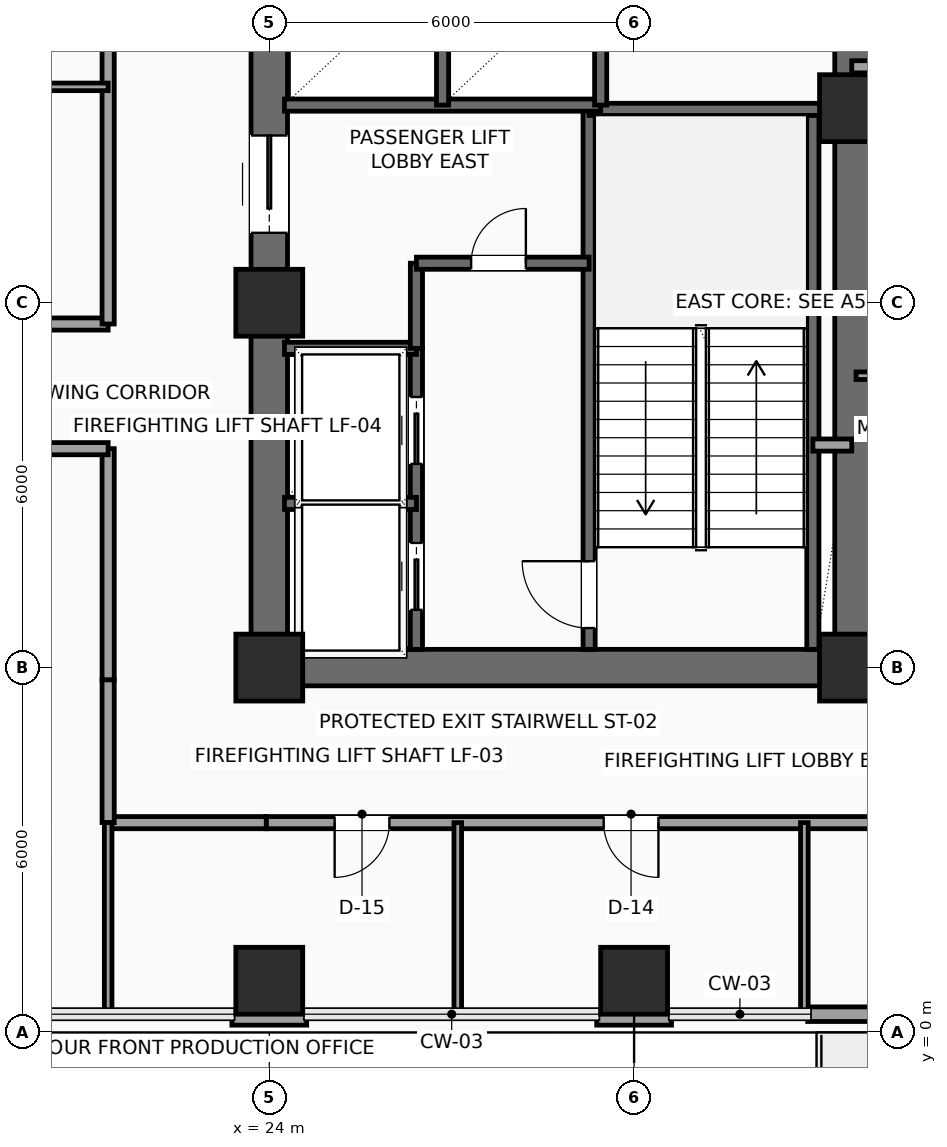
"""IFC4 building model, lengths in metres.
Left out: names, types, materials, properties, quantities, classifications, styles, units other than length and angle.
Written with IfcOpenShell. Run it as: python <this file> out.ifc"""

import sys

from ifc_helpers import new_model, si_unit, direction, frame, frame_2d, origin, origin_2d, place, context, subcontext, project, spatial, rectangle, extrude, element, fill, save


model = new_model("IFC4")
c1 = context("Model", 3, precision=1e-05, world=origin(), true_north=direction((0.0, 1.0)))
c2 = subcontext(c1, "Body", "Model", "MODEL_VIEW")
j1 = project(units=[si_unit("LENGTHUNIT", "METRE"), si_unit("PLANEANGLEUNIT", "RADIAN")], contexts=[c1])
p1 = place(None, origin())
s1 = spatial("IfcSite", under=j1, at=p1, CompositionType="ELEMENT")
p2 = place(p1, origin())
s2 = spatial("IfcBuilding", under=s1, at=p2, CompositionType="ELEMENT")
p3 = place(p2, frame((0.0, 0.0, 149.4)))
s3 = spatial("IfcBuildingStorey", under=s2, at=p3, CompositionType="ELEMENT", Elevation=149.4)
for number, where, z_axis, x_axis in (
    (1, (24.0, 6.0, 0.0), (0.0, 0.0, 1.0), (1.0, 0.0, 0.0)),
    (2, (24.0, 12.0, 0.0), (0.0, 0.0, 1.0), (1.0, 0.0, 0.0)),
    (3, (33.6, 6.0, 0.0), (0.0, 0.0, 1.0), (1.0, 0.0, 0.0)),
    (4, (33.6, 15.2, 0.0), (0.0, 0.0, 1.0), (1.0, 0.0, 0.0)),
    (5, (24.0, 0.85, 0.0), (0.0, 0.0, 1.0), (1.0, 0.0, 0.0)),
    (6, (30.0, 0.85, 0.0), (0.0, 0.0, 1.0), (1.0, 0.0, 0.0)),
):
    element("IfcColumn", number, at=place(p3, frame(where, z_axis=z_axis, x_axis=x_axis)), inside=s3, PredefinedType="COLUMN", context=c2, shape_type="SweptSolid", body=[
        extrude(rectangle(XDim=1.1, YDim=1.1, at=origin_2d()), origin(), (0.0, 0.0, 1.0), 3.75),
    ])
p4 = place(p3, frame((42.145, 0.3, 0.0), z_axis=(0.0, 0.0, 1.0), x_axis=(-1.0, 0.0, 0.0)))
e7 = element("IfcWall", 7, at=p4, inside=s3, PredefinedType="SOLIDWALL", context=c2, shape_type="SweptSolid", body=[
    extrude(rectangle(XDim=9.29, YDim=0.24, at=frame_2d((4.645, 0.0))), origin(), (0.0, 0.0, 1.0), 3.525),
])
p5 = place(p4, frame((4.2, 0.0, 0.0)))
e8 = element("IfcOpeningElement", 8, at=p5, cuts=e7, PredefinedType="OPENING", context=c2, shape_type="SweptSolid", body=[
    extrude(rectangle(XDim=1.05, YDim=2.2, at=frame_2d((0.525, 1.1))), frame((0.0, 0.13, 0.0), z_axis=(0.0, -1.0, 0.0), x_axis=(1.0, 0.0, 0.0)), (0.0, 0.0, 1.0), 0.26),
])
for number, where, z_axis, x_axis in (
    (9, (30.615, 0.24, 0.0), (0.0, 0.0, 1.0), (-1.0, 0.0, 0.0)),
    (10, (24.615, 0.24, 0.0), (0.0, 0.0, 1.0), (-1.0, 0.0, 0.0)),
):
    element("IfcWall", number, at=place(p3, frame(where, z_axis=z_axis, x_axis=x_axis)), inside=s3, PredefinedType="SOLIDWALL", context=c2, shape_type="SweptSolid", body=[
        extrude(rectangle(XDim=1.23, YDim=0.24, at=frame_2d((0.615, 0.0))), origin(), (0.0, 0.0, 1.0), 3.525),
    ])
p6 = place(p3, frame((24.0, 6.0, 0.0), z_axis=(0.0, 0.0, 1.0), x_axis=(1.0, 0.0, 0.0)))
e11 = element("IfcWall", 11, at=p6, inside=s3, PredefinedType="SHEAR", context=c2, shape_type="SweptSolid", body=[
    extrude(rectangle(XDim=9.6, YDim=0.6, at=frame_2d((4.8, 0.0))), origin(), (0.0, 0.0, 1.0), 3.525),
])
p7 = place(p3, frame((24.0, 6.0, 0.0), z_axis=(0.0, 0.0, 1.0), x_axis=(0.0, 1.0, 0.0)))
e12 = element("IfcWall", 12, at=p7, inside=s3, PredefinedType="SHEAR", context=c2, shape_type="SweptSolid", body=[
    extrude(rectangle(XDim=12.0, YDim=0.6, at=frame_2d((6.0, 0.0))), origin(), (0.0, 0.0, 1.0), 3.525),
])
p8 = place(p7, frame((7.15, 0.0, 0.0)))
e13 = element("IfcOpeningElement", 13, at=p8, cuts=e12, PredefinedType="OPENING", context=c2, shape_type="SweptSolid", body=[
    extrude(rectangle(XDim=1.6, YDim=2.3, at=frame_2d((0.8, 1.15))), frame((0.0, 0.31, 0.0), z_axis=(0.0, -1.0, 0.0), x_axis=(1.0, 0.0, 0.0)), (0.0, 0.0, 1.0), 0.62),
])
p9 = place(p3, frame((33.6, 6.0, 0.0), z_axis=(0.0, 0.0, 1.0), x_axis=(0.0, 1.0, 0.0)))
e14 = element("IfcWall", 14, at=p9, inside=s3, PredefinedType="SHEAR", context=c2, shape_type="SweptSolid", body=[
    extrude(rectangle(XDim=12.0, YDim=0.6, at=frame_2d((6.0, 0.0))), origin(), (0.0, 0.0, 1.0), 3.525),
])
p10 = place(p9, frame((10.15, 0.0, 0.0)))
e15 = element("IfcOpeningElement", 15, at=p10, cuts=e14, PredefinedType="OPENING", context=c2, shape_type="SweptSolid", body=[
    extrude(rectangle(XDim=0.9, YDim=2.15, at=frame_2d((0.45, 1.075))), frame((0.0, 0.31, 0.0), z_axis=(0.0, -1.0, 0.0), x_axis=(1.0, 0.0, 0.0)), (0.0, 0.0, 1.0), 0.62),
])
p11 = place(p3, frame((29.26, 6.3, 0.0), z_axis=(0.0, 0.0, 1.0), x_axis=(0.0, 1.0, 0.0)))
e16 = element("IfcWall", 16, at=p11, inside=s3, PredefinedType="SHEAR", context=c2, shape_type="SweptSolid", body=[
    extrude(rectangle(XDim=8.88, YDim=0.2, at=frame_2d((4.44, 0.0))), origin(), (0.0, 0.0, 1.0), 3.525),
])
p12 = place(p11, frame((0.35, 0.0, 0.0)))
e17 = element("IfcOpeningElement", 17, at=p12, cuts=e16, PredefinedType="OPENING", context=c2, shape_type="SweptSolid", body=[
    extrude(rectangle(XDim=1.1, YDim=2.2, at=frame_2d((0.55, 1.1))), frame((0.0, 0.11, 0.0), z_axis=(0.0, -1.0, 0.0), x_axis=(1.0, 0.0, 0.0)), (0.0, 0.0, 1.0), 0.22),
])
p13 = place(p3, frame((32.94, 6.3, 0.0), z_axis=(0.0, 0.0, 1.0), x_axis=(0.0, 1.0, 0.0)))
e18 = element("IfcWall", 18, at=p13, inside=s3, PredefinedType="SHEAR", context=c2, shape_type="SweptSolid", body=[
    extrude(rectangle(XDim=8.88, YDim=0.2, at=frame_2d((4.44, 0.0))), origin(), (0.0, 0.0, 1.0), 3.525),
])
p14 = place(p3, frame((29.26, 15.18, 0.0), z_axis=(0.0, 0.0, 1.0), x_axis=(1.0, 0.0, 0.0)))
e19 = element("IfcWall", 19, at=p14, inside=s3, PredefinedType="SHEAR", context=c2, shape_type="SweptSolid", body=[
    extrude(rectangle(XDim=4.04, YDim=0.2, at=frame_2d((2.02, 0.0))), origin(), (0.0, 0.0, 1.0), 3.525),
])
p15 = place(p3, frame((26.42, 6.3, 0.0), z_axis=(0.0, 0.0, 1.0), x_axis=(0.0, 1.0, 0.0)))
e20 = element("IfcWall", 20, at=p15, inside=s3, PredefinedType="SHEAR", context=c2, shape_type="SweptSolid", body=[
    extrude(rectangle(XDim=4.95, YDim=0.2, at=frame_2d((2.475, 0.0))), origin(), (0.0, 0.0, 1.0), 3.525),
])
p16 = place(p15, frame((0.65, 0.0, 0.0)))
e21 = element("IfcOpeningElement", 21, at=p16, cuts=e20, PredefinedType="OPENING", context=c2, shape_type="SweptSolid", body=[
    extrude(rectangle(XDim=1.1, YDim=2.2, at=frame_2d((0.55, 1.1))), frame((0.0, 0.11, 0.0), z_axis=(0.0, -1.0, 0.0), x_axis=(1.0, 0.0, 0.0)), (0.0, 0.0, 1.0), 0.22),
])
p17 = place(p15, frame((3.05, 0.0, 0.0)))
e22 = element("IfcOpeningElement", 22, at=p17, cuts=e20, PredefinedType="OPENING", context=c2, shape_type="SweptSolid", body=[
    extrude(rectangle(XDim=1.1, YDim=2.2, at=frame_2d((0.55, 1.1))), frame((0.0, 0.11, 0.0), z_axis=(0.0, -1.0, 0.0), x_axis=(1.0, 0.0, 0.0)), (0.0, 0.0, 1.0), 0.22),
])
for number, where, z_axis, x_axis in (
    (23, (24.25, 8.7, 0.0), (0.0, 0.0, 1.0), (1.0, 0.0, 0.0)),
    (24, (24.25, 11.25, 0.0), (0.0, 0.0, 1.0), (1.0, 0.0, 0.0)),
):
    element("IfcWall", number, at=place(p3, frame(where, z_axis=z_axis, x_axis=x_axis)), inside=s3, PredefinedType="SHEAR", context=c2, shape_type="SweptSolid", body=[
        extrude(rectangle(XDim=2.17, YDim=0.2, at=frame_2d((1.085, 0.0))), origin(), (0.0, 0.0, 1.0), 3.525),
    ])
p18 = place(p3, frame((26.42, 11.25, 0.0), z_axis=(0.0, 0.0, 1.0), x_axis=(0.0, 1.0, 0.0)))
e25 = element("IfcWall", 25, at=p18, inside=s3, PredefinedType="SHEAR", context=c2, shape_type="SweptSolid", body=[
    extrude(rectangle(XDim=1.4, YDim=0.2, at=frame_2d((0.7, 0.0))), origin(), (0.0, 0.0, 1.0), 3.525),
])
p19 = place(p3, frame((26.42, 12.65, 0.0), z_axis=(0.0, 0.0, 1.0), x_axis=(1.0, 0.0, 0.0)))
e26 = element("IfcWall", 26, at=p19, inside=s3, PredefinedType="SHEAR", context=c2, shape_type="SweptSolid", body=[
    extrude(rectangle(XDim=2.84, YDim=0.2, at=frame_2d((1.42, 0.0))), origin(), (0.0, 0.0, 1.0), 3.525),
])
p20 = place(p19, frame((0.9, 0.0, 0.0)))
e27 = element("IfcOpeningElement", 27, at=p20, cuts=e26, PredefinedType="OPENING", context=c2, shape_type="SweptSolid", body=[
    extrude(rectangle(XDim=0.9, YDim=2.15, at=frame_2d((0.45, 1.075))), frame((0.0, 0.11, 0.0), z_axis=(0.0, -1.0, 0.0), x_axis=(1.0, 0.0, 0.0)), (0.0, 0.0, 1.0), 0.22),
])
p21 = place(p3, frame((32.94, 9.66, 0.0), z_axis=(0.0, 0.0, 1.0), x_axis=(1.0, 0.0, 0.0)))
e28 = element("IfcWall", 28, at=p21, inside=s3, PredefinedType="SOLIDWALL", context=c2, shape_type="SweptSolid", body=[
    extrude(rectangle(XDim=0.64, YDim=0.2, at=frame_2d((0.32, 0.0))), origin(), (0.0, 0.0, 1.0), 3.525),
])
p22 = place(p3, frame((24.25, 15.25, 0.0), z_axis=(0.0, 0.0, 1.0), x_axis=(1.0, 0.0, 0.0)))
e29 = element("IfcWall", 29, at=p22, inside=s3, PredefinedType="SHEAR", context=c2, shape_type="SweptSolid", body=[
    extrude(rectangle(XDim=5.2, YDim=0.2, at=frame_2d((2.6, 0.0))), origin(), (0.0, 0.0, 1.0), 3.525),
])
p23 = place(p3, frame((26.85, 15.25, 0.0), z_axis=(0.0, 0.0, 1.0), x_axis=(0.0, 1.0, 0.0)))
e30 = element("IfcWall", 30, at=p23, inside=s3, PredefinedType="SHEAR", context=c2, shape_type="SweptSolid", body=[
    extrude(rectangle(XDim=2.4, YDim=0.2, at=frame_2d((1.2, 0.0))), origin(), (0.0, 0.0, 1.0), 3.525),
])
p24 = place(p3, frame((29.45, 15.25, 0.0), z_axis=(0.0, 0.0, 1.0), x_axis=(0.0, 1.0, 0.0)))
e31 = element("IfcWall", 31, at=p24, inside=s3, PredefinedType="SHEAR", context=c2, shape_type="SweptSolid", body=[
    extrude(rectangle(XDim=2.45, YDim=0.2, at=frame_2d((1.225, 0.0))), origin(), (0.0, 0.0, 1.0), 3.525),
])
p25 = place(p3, frame((36.15, 15.88, 0.0), z_axis=(0.0, 0.0, 1.0), x_axis=(-1.0, 0.0, 0.0)))
e32 = element("IfcWall", 32, at=p25, inside=s3, PredefinedType="SOLIDWALL", context=c2, shape_type="SweptSolid", body=[
    extrude(rectangle(XDim=2.57, YDim=0.2, at=frame_2d((1.285, 0.0))), origin(), (0.0, 0.0, 1.0), 3.525),
])
p26 = place(p3, frame((36.15, 3.45, 0.0), z_axis=(0.0, 0.0, 1.0), x_axis=(-1.0, 0.0, 0.0)))
e33 = element("IfcWall", 33, at=p26, inside=s3, PredefinedType="SOLIDWALL", context=c2, shape_type="SweptSolid", body=[
    extrude(rectangle(XDim=12.2, YDim=0.2, at=frame_2d((6.1, 0.0))), origin(), (0.0, 0.0, 1.0), 3.067),
])
p27 = place(p26, frame((10.175, 0.0, 0.0)))
e34 = element("IfcOpeningElement", 34, at=p27, cuts=e33, PredefinedType="OPENING", context=c2, shape_type="SweptSolid", body=[
    extrude(rectangle(XDim=0.9, YDim=2.1, at=frame_2d((0.45, 1.05))), frame((0.0, 0.11, 0.0), z_axis=(0.0, -1.0, 0.0), x_axis=(1.0, 0.0, 0.0)), (0.0, 0.0, 1.0), 0.22),
])
p28 = place(p26, frame((5.75, 0.0, 0.0)))
e35 = element("IfcOpeningElement", 35, at=p28, cuts=e33, PredefinedType="OPENING", context=c2, shape_type="SweptSolid", body=[
    extrude(rectangle(XDim=0.9, YDim=2.1, at=frame_2d((0.45, 1.05))), frame((0.0, 0.11, 0.0), z_axis=(0.0, -1.0, 0.0), x_axis=(1.0, 0.0, 0.0)), (0.0, 0.0, 1.0), 0.22),
])
p29 = place(p3, frame((23.95, 3.45, 0.0), z_axis=(0.0, 0.0, 1.0), x_axis=(-1.0, 0.0, 0.0)))
e36 = element("IfcWall", 36, at=p29, inside=s3, PredefinedType="SOLIDWALL", context=c2, shape_type="SweptSolid", body=[
    extrude(rectangle(XDim=2.6, YDim=0.2, at=frame_2d((1.3, 0.0))), origin(), (0.0, 0.0, 1.0), 3.067),
])
p30 = place(p3, frame((21.35, 3.45, 0.0), z_axis=(0.0, 0.0, 1.0), x_axis=(0.0, 1.0, 0.0)))
e37 = element("IfcWall", 37, at=p30, inside=s3, PredefinedType="SOLIDWALL", context=c2, shape_type="SweptSolid", body=[
    extrude(rectangle(XDim=2.35, YDim=0.2, at=frame_2d((1.175, 0.0))), origin(), (0.0, 0.0, 1.0), 3.525),
])
p31 = place(p3, frame((21.35, 5.8, 0.0), z_axis=(0.0, 0.0, 1.0), x_axis=(0.0, 1.0, 0.0)))
e38 = element("IfcWall", 38, at=p31, inside=s3, PredefinedType="SOLIDWALL", context=c2, shape_type="SweptSolid", body=[
    extrude(rectangle(XDim=3.8, YDim=0.2, at=frame_2d((1.9, 0.0))), origin(), (0.0, 0.0, 1.0), 3.525),
])
p32 = place(p3, frame((21.35, 9.6, 0.0), z_axis=(0.0, 0.0, 1.0), x_axis=(-1.0, 0.0, 0.0)))
e39 = element("IfcWall", 39, at=p32, inside=s3, PredefinedType="SOLIDWALL", context=c2, shape_type="SweptSolid", body=[
    extrude(rectangle(XDim=18.15, YDim=0.2, at=frame_2d((9.075, 0.0))), origin(), (0.0, 0.0, 1.0), 3.525),
])
p33 = place(p32, frame((14.7, 0.0, 0.0)))
e40 = element("IfcOpeningElement", 40, at=p33, cuts=e39, PredefinedType="OPENING", context=c2, shape_type="SweptSolid", body=[
    extrude(rectangle(XDim=0.9, YDim=2.1, at=frame_2d((0.45, 1.05))), frame((0.0, 0.11, 0.0), z_axis=(0.0, -1.0, 0.0), x_axis=(1.0, 0.0, 0.0)), (0.0, 0.0, 1.0), 0.22),
])
p34 = place(p32, frame((8.6, 0.0, 0.0)))
e41 = element("IfcOpeningElement", 41, at=p34, cuts=e39, PredefinedType="OPENING", context=c2, shape_type="SweptSolid", body=[
    extrude(rectangle(XDim=0.9, YDim=2.1, at=frame_2d((0.45, 1.05))), frame((0.0, 0.11, 0.0), z_axis=(0.0, -1.0, 0.0), x_axis=(1.0, 0.0, 0.0)), (0.0, 0.0, 1.0), 0.22),
])
p35 = place(p32, frame((2.525, 0.0, 0.0)))
e42 = element("IfcOpeningElement", 42, at=p35, cuts=e39, PredefinedType="OPENING", context=c2, shape_type="SweptSolid", body=[
    extrude(rectangle(XDim=0.9, YDim=2.1, at=frame_2d((0.45, 1.05))), frame((0.0, 0.11, 0.0), z_axis=(0.0, -1.0, 0.0), x_axis=(1.0, 0.0, 0.0)), (0.0, 0.0, 1.0), 0.22),
])
p36 = place(p3, frame((10.8, 11.65, 0.0), z_axis=(0.0, 0.0, 1.0), x_axis=(1.0, 0.0, 0.0)))
e43 = element("IfcWall", 43, at=p36, inside=s3, PredefinedType="SOLIDWALL", context=c2, shape_type="SweptSolid", body=[
    extrude(rectangle(XDim=10.55, YDim=0.2, at=frame_2d((5.275, 0.0))), origin(), (0.0, 0.0, 1.0), 3.525),
])
p37 = place(p36, frame((1.98, 0.0, 0.0)))
e44 = element("IfcOpeningElement", 44, at=p37, cuts=e43, PredefinedType="OPENING", context=c2, shape_type="SweptSolid", body=[
    extrude(rectangle(XDim=0.9, YDim=2.1, at=frame_2d((0.45, 1.05))), frame((0.0, 0.11, 0.0), z_axis=(0.0, -1.0, 0.0), x_axis=(1.0, 0.0, 0.0)), (0.0, 0.0, 1.0), 0.22),
])
p38 = place(p36, frame((4.95, 0.0, 0.0)))
e45 = element("IfcOpeningElement", 45, at=p38, cuts=e43, PredefinedType="OPENING", context=c2, shape_type="SweptSolid", body=[
    extrude(rectangle(XDim=0.9, YDim=2.1, at=frame_2d((0.45, 1.05))), frame((0.0, 0.11, 0.0), z_axis=(0.0, -1.0, 0.0), x_axis=(1.0, 0.0, 0.0)), (0.0, 0.0, 1.0), 0.22),
])
p39 = place(p36, frame((8.425, 0.0, 0.0)))
e46 = element("IfcOpeningElement", 46, at=p39, cuts=e43, PredefinedType="OPENING", context=c2, shape_type="SweptSolid", body=[
    extrude(rectangle(XDim=0.9, YDim=2.1, at=frame_2d((0.45, 1.05))), frame((0.0, 0.11, 0.0), z_axis=(0.0, -1.0, 0.0), x_axis=(1.0, 0.0, 0.0)), (0.0, 0.0, 1.0), 0.22),
])
p40 = place(p3, frame((21.35, 11.65, 0.0), z_axis=(0.0, 0.0, 1.0), x_axis=(0.0, 1.0, 0.0)))
e47 = element("IfcWall", 47, at=p40, inside=s3, PredefinedType="SOLIDWALL", context=c2, shape_type="SweptSolid", body=[
    extrude(rectangle(XDim=18.6, YDim=0.2, at=frame_2d((9.3, 0.0))), origin(), (0.0, 0.0, 1.0), 3.525),
])
p41 = place(p40, frame((7.2, 0.0, 0.0)))
e48 = element("IfcOpeningElement", 48, at=p41, cuts=e47, PredefinedType="OPENING", context=c2, shape_type="SweptSolid", body=[
    extrude(rectangle(XDim=0.95, YDim=2.15, at=frame_2d((0.475, 1.075))), frame((0.0, 0.11, 0.0), z_axis=(0.0, -1.0, 0.0), x_axis=(1.0, 0.0, 0.0)), (0.0, 0.0, 1.0), 0.22),
])
p42 = place(p40, frame((10.45, 0.0, 0.0)))
e49 = element("IfcOpeningElement", 49, at=p42, cuts=e47, PredefinedType="OPENING", context=c2, shape_type="SweptSolid", body=[
    extrude(rectangle(XDim=0.9, YDim=2.1, at=frame_2d((0.45, 1.05))), frame((0.0, 0.11, 0.0), z_axis=(0.0, -1.0, 0.0), x_axis=(1.0, 0.0, 0.0)), (0.0, 0.0, 1.0), 0.22),
])
p43 = place(p40, frame((13.9, 0.0, 0.0)))
e50 = element("IfcOpeningElement", 50, at=p43, cuts=e47, PredefinedType="OPENING", context=c2, shape_type="SweptSolid", body=[
    extrude(rectangle(XDim=0.95, YDim=2.15, at=frame_2d((0.475, 1.075))), frame((0.0, 0.11, 0.0), z_axis=(0.0, -1.0, 0.0), x_axis=(1.0, 0.0, 0.0)), (0.0, 0.0, 1.0), 0.22),
])
p44 = place(p40, frame((4.65, 0.0, 0.0)))
e51 = element("IfcOpeningElement", 51, at=p44, cuts=e47, PredefinedType="OPENING", context=c2, shape_type="SweptSolid", body=[
    extrude(rectangle(XDim=0.9, YDim=2.1, at=frame_2d((0.45, 1.05))), frame((0.0, 0.11, 0.0), z_axis=(0.0, -1.0, 0.0), x_axis=(1.0, 0.0, 0.0)), (0.0, 0.0, 1.0), 0.22),
])
p45 = place(p3, frame((18.0, 15.55, 0.0), z_axis=(0.0, 0.0, 1.0), x_axis=(1.0, 0.0, 0.0)))
e52 = element("IfcWall", 52, at=p45, inside=s3, PredefinedType="PARTITIONING", context=c2, shape_type="SweptSolid", body=[
    extrude(rectangle(XDim=3.35, YDim=0.125, at=frame_2d((1.675, 0.0))), origin(), (0.0, 0.0, 1.0), 3.525),
])
for number, where, z_axis, x_axis in (
    (53, (21.35, 0.3, 0.0), (0.0, 0.0, 1.0), (0.0, 1.0, 0.0)),
    (54, (27.1, 0.3, 0.0), (0.0, 0.0, 1.0), (0.0, 1.0, 0.0)),
    (55, (32.8, 0.3, 0.0), (0.0, 0.0, 1.0), (0.0, 1.0, 0.0)),
):
    element("IfcWall", number, at=place(p3, frame(where, z_axis=z_axis, x_axis=x_axis)), inside=s3, PredefinedType="PARTITIONING", context=c2, shape_type="SweptSolid", body=[
        extrude(rectangle(XDim=3.15, YDim=0.125, at=frame_2d((1.575, 0.0))), origin(), (0.0, 0.0, 1.0), 3.525),
    ])
p46 = place(p3, frame((33.65, 5.8, 0.0), z_axis=(0.0, 0.0, 1.0), x_axis=(1.0, 0.0, 0.0)))
e56 = element("IfcWall", 56, at=p46, inside=s3, PredefinedType="PARTITIONING", context=c2, shape_type="SweptSolid", body=[
    extrude(rectangle(XDim=2.5, YDim=0.125, at=frame_2d((1.25, 0.0))), origin(), (0.0, 0.0, 1.0), 3.017),
])
p47 = place(p3, frame((33.65, 10.8, 0.0), z_axis=(0.0, 0.0, 1.0), x_axis=(1.0, 0.0, 0.0)))
e57 = element("IfcWall", 57, at=p47, inside=s3, PredefinedType="PARTITIONING", context=c2, shape_type="SweptSolid", body=[
    extrude(rectangle(XDim=2.5, YDim=0.125, at=frame_2d((1.25, 0.0))), origin(), (0.0, 0.0, 1.0), 3.525),
])
p48 = place(p8, origin())
e58 = element("IfcDoor", 58, at=p48, inside=s3, OperationType="DOUBLE_DOOR_SLIDING", PredefinedType="DOOR", context=c2, shape_type="SweptSolid", body=[
    extrude(rectangle(XDim=1.6, YDim=2.3, at=frame_2d((0.8, 1.15))), frame((0.0, 0.025, 0.0), z_axis=(0.0, -1.0, 0.0), x_axis=(1.0, 0.0, 0.0)), (0.0, 0.0, 1.0), 0.05),
])
fill(e13, e58)
p49 = place(p12, origin())
e59 = element("IfcDoor", 59, at=p49, inside=s3, OperationType="SINGLE_SWING_RIGHT", PredefinedType="DOOR", context=c2, shape_type="SweptSolid", body=[
    extrude(rectangle(XDim=1.1, YDim=2.2, at=frame_2d((0.55, 1.1))), frame((0.0, 0.025, 0.0), z_axis=(0.0, -1.0, 0.0), x_axis=(1.0, 0.0, 0.0)), (0.0, 0.0, 1.0), 0.05),
])
fill(e17, e59)
p50 = place(p16, origin())
e60 = element("IfcDoor", 60, at=p50, inside=s3, OperationType="SLIDING_TO_LEFT", PredefinedType="DOOR", context=c2, shape_type="SweptSolid", body=[
    extrude(rectangle(XDim=1.1, YDim=2.2, at=frame_2d((0.55, 1.1))), frame((0.0, 0.025, 0.0), z_axis=(0.0, -1.0, 0.0), x_axis=(1.0, 0.0, 0.0)), (0.0, 0.0, 1.0), 0.05),
])
fill(e21, e60)
p51 = place(p17, origin())
e61 = element("IfcDoor", 61, at=p51, inside=s3, OperationType="SLIDING_TO_LEFT", PredefinedType="DOOR", context=c2, shape_type="SweptSolid", body=[
    extrude(rectangle(XDim=1.1, YDim=2.2, at=frame_2d((0.55, 1.1))), frame((0.0, 0.025, 0.0), z_axis=(0.0, -1.0, 0.0), x_axis=(1.0, 0.0, 0.0)), (0.0, 0.0, 1.0), 0.05),
])
fill(e22, e61)
p52 = place(p20, origin())
e62 = element("IfcDoor", 62, at=p52, inside=s3, OperationType="SINGLE_SWING_RIGHT", PredefinedType="DOOR", context=c2, shape_type="SweptSolid", body=[
    extrude(rectangle(XDim=0.9, YDim=2.15, at=frame_2d((0.45, 1.075))), frame((0.0, 0.025, 0.0), z_axis=(0.0, -1.0, 0.0), x_axis=(1.0, 0.0, 0.0)), (0.0, 0.0, 1.0), 0.05),
])
fill(e27, e62)
p53 = place(p27, origin())
e63 = element("IfcDoor", 63, at=p53, inside=s3, OperationType="SINGLE_SWING_RIGHT", PredefinedType="DOOR", context=c2, shape_type="SweptSolid", body=[
    extrude(rectangle(XDim=0.9, YDim=2.1, at=frame_2d((0.45, 1.05))), frame((0.0, 0.025, 0.0), z_axis=(0.0, -1.0, 0.0), x_axis=(1.0, 0.0, 0.0)), (0.0, 0.0, 1.0), 0.05),
])
fill(e34, e63)
p54 = place(p28, origin())
e64 = element("IfcDoor", 64, at=p54, inside=s3, OperationType="SINGLE_SWING_LEFT", PredefinedType="DOOR", context=c2, shape_type="SweptSolid", body=[
    extrude(rectangle(XDim=0.9, YDim=2.1, at=frame_2d((0.45, 1.05))), frame((0.0, 0.025, 0.0), z_axis=(0.0, -1.0, 0.0), x_axis=(1.0, 0.0, 0.0)), (0.0, 0.0, 1.0), 0.05),
])
fill(e35, e64)
save(model, sys.argv[1])
